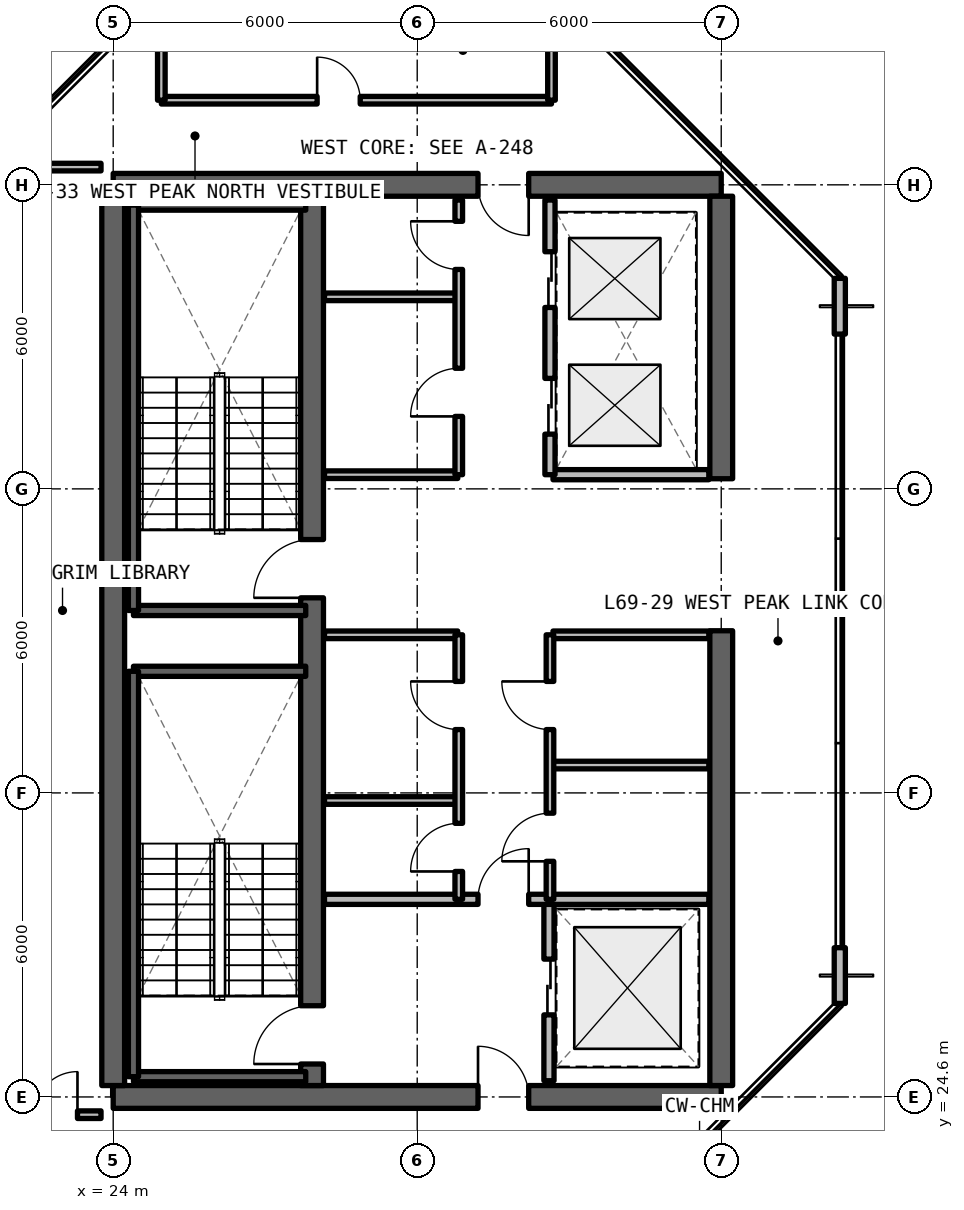
"""IFC4 building model, lengths in metres.
Left out: names, types, materials, properties, quantities, classifications, styles, units other than length and angle.
Written with IfcOpenShell. Run it as: python <this file> out.ifc"""

import sys

from ifc_helpers import new_model, si_unit, direction, frame, frame_2d, origin, place, context, subcontext, project, spatial, rectangle, extrude, element, fill, save


model = new_model("IFC4")
c1 = context("Model", 3, precision=1e-05, world=origin(), true_north=direction((0.0, 1.0)))
c2 = subcontext(c1, "Body", "Model", "MODEL_VIEW")
j1 = project(units=[si_unit("LENGTHUNIT", "METRE"), si_unit("PLANEANGLEUNIT", "RADIAN")], contexts=[c1])
p1 = place(None, origin())
s1 = spatial("IfcSite", under=j1, at=p1, CompositionType="ELEMENT")
p2 = place(p1, origin())
s2 = spatial("IfcBuilding", under=s1, at=p2, CompositionType="ELEMENT")
p3 = place(p2, frame((0.0, 0.0, 246.18)))
s3 = spatial("IfcBuildingStorey", under=s2, at=p3, CompositionType="ELEMENT", Elevation=246.18)
p4 = place(p3, frame((24.0, 24.6, 0.0), z_axis=(0.0, 0.0, 1.0), x_axis=(1.0, 0.0, 0.0)))
e1 = element("IfcWall", 1, at=p4, inside=s3, PredefinedType="SHEAR", context=c2, shape_type="SweptSolid", body=[
    extrude(rectangle(XDim=12.0, YDim=0.45, at=frame_2d((6.0, 0.0))), origin(), (0.0, 0.0, 1.0), 3.63),
])
p5 = place(p4, frame((7.2, 0.0, 0.0)))
e2 = element("IfcOpeningElement", 2, at=p5, cuts=e1, PredefinedType="OPENING", context=c2, shape_type="SweptSolid", body=[
    extrude(rectangle(XDim=1.0, YDim=2.15, at=frame_2d((0.5, 1.075))), frame((0.0, 0.235, 0.0), z_axis=(0.0, -1.0, 0.0), x_axis=(1.0, 0.0, 0.0)), (0.0, 0.0, 1.0), 0.47),
])
p6 = place(p3, frame((36.0, 42.6, 0.0), z_axis=(0.0, 0.0, 1.0), x_axis=(-1.0, 0.0, 0.0)))
e3 = element("IfcWall", 3, at=p6, inside=s3, PredefinedType="SHEAR", context=c2, shape_type="SweptSolid", body=[
    extrude(rectangle(XDim=12.0, YDim=0.45, at=frame_2d((6.0, 0.0))), origin(), (0.0, 0.0, 1.0), 3.63),
])
p7 = place(p6, frame((3.8, 0.0, 0.0)))
e4 = element("IfcOpeningElement", 4, at=p7, cuts=e3, PredefinedType="OPENING", context=c2, shape_type="SweptSolid", body=[
    extrude(rectangle(XDim=1.0, YDim=2.15, at=frame_2d((0.5, 1.075))), frame((0.0, 0.235, 0.0), z_axis=(0.0, -1.0, 0.0), x_axis=(1.0, 0.0, 0.0)), (0.0, 0.0, 1.0), 0.47),
])
p8 = place(p3, frame((24.0, 24.825, 0.0), z_axis=(0.0, 0.0, 1.0), x_axis=(0.0, 1.0, 0.0)))
e5 = element("IfcWall", 5, at=p8, inside=s3, PredefinedType="SHEAR", context=c2, shape_type="SweptSolid", body=[
    extrude(rectangle(XDim=17.55, YDim=0.45, at=frame_2d((8.775, 0.0))), origin(), (0.0, 0.0, 1.0), 3.63),
])
p9 = place(p3, frame((36.0, 24.825, 0.0), z_axis=(0.0, 0.0, 1.0), x_axis=(0.0, 1.0, 0.0)))
e6 = element("IfcWall", 6, at=p9, inside=s3, PredefinedType="SHEAR", context=c2, shape_type="SweptSolid", body=[
    extrude(rectangle(XDim=8.975, YDim=0.45, at=frame_2d((4.488, 0.0))), origin(), (0.0, 0.0, 1.0), 3.63),
])
p10 = place(p3, frame((36.0, 36.8, 0.0), z_axis=(0.0, 0.0, 1.0), x_axis=(0.0, 1.0, 0.0)))
e7 = element("IfcWall", 7, at=p10, inside=s3, PredefinedType="SHEAR", context=c2, shape_type="SweptSolid", body=[
    extrude(rectangle(XDim=5.575, YDim=0.45, at=frame_2d((2.788, 0.0))), origin(), (0.0, 0.0, 1.0), 3.63),
])
p11 = place(p3, frame((27.925, 24.825, 0.0), z_axis=(0.0, 0.0, 1.0), x_axis=(0.0, 1.0, 0.0)))
e8 = element("IfcWall", 8, at=p11, inside=s3, PredefinedType="SHEAR", context=c2, shape_type="SweptSolid", body=[
    extrude(rectangle(XDim=17.55, YDim=0.45, at=frame_2d((8.775, 0.0))), origin(), (0.0, 0.0, 1.0), 3.63),
])
p12 = place(p11, frame((0.425, 0.0, 0.0)))
e9 = element("IfcOpeningElement", 9, at=p12, cuts=e8, PredefinedType="OPENING", context=c2, shape_type="SweptSolid", body=[
    extrude(rectangle(XDim=1.15, YDim=2.15, at=frame_2d((0.575, 1.075))), frame((0.0, 0.235, 0.0), z_axis=(0.0, -1.0, 0.0), x_axis=(1.0, 0.0, 0.0)), (0.0, 0.0, 1.0), 0.47),
])
p13 = place(p11, frame((9.625, 0.0, 0.0)))
e10 = element("IfcOpeningElement", 10, at=p13, cuts=e8, PredefinedType="OPENING", context=c2, shape_type="SweptSolid", body=[
    extrude(rectangle(XDim=1.15, YDim=2.15, at=frame_2d((0.575, 1.075))), frame((0.0, 0.235, 0.0), z_axis=(0.0, -1.0, 0.0), x_axis=(1.0, 0.0, 0.0)), (0.0, 0.0, 1.0), 0.47),
])
for number, where, z_axis, x_axis in (
    (11, (38.34, 26.446, 0.0), (0.0, 0.0, 1.0), (0.0, 1.0, 0.0)),
    (12, (38.34, 39.654, 0.0), (0.0, 0.0, 1.0), (0.0, 1.0, 0.0)),
):
    element("IfcWall", number, at=place(p3, frame(where, z_axis=z_axis, x_axis=x_axis)), inside=s3, PredefinedType="SOLIDWALL", context=c2, shape_type="SweptSolid", body=[
        extrude(rectangle(XDim=1.1, YDim=0.22, at=frame_2d((0.55, 0.0))), origin(), (0.0, 0.0, 1.0), 3.41),
    ])
p14 = place(p3, frame((32.6, 24.92, 0.0), z_axis=(0.0, 0.0, 1.0), x_axis=(0.0, 1.0, 0.0)))
e13 = element("IfcWall", 13, at=p14, inside=s3, PredefinedType="SOLIDWALL", context=c2, shape_type="SweptSolid", body=[
    extrude(rectangle(XDim=3.58, YDim=0.2, at=frame_2d((1.79, 0.0))), origin(), (0.0, 0.0, 1.0), 2.63),
])
p15 = place(p14, frame((1.3, 0.0, 0.0)))
e14 = element("IfcOpeningElement", 14, at=p15, cuts=e13, PredefinedType="OPENING", context=c2, shape_type="SweptSolid", body=[
    extrude(rectangle(XDim=1.1, YDim=2.2, at=frame_2d((0.55, 1.1))), frame((0.0, 0.11, 0.0), z_axis=(0.0, -1.0, 0.0), x_axis=(1.0, 0.0, 0.0)), (0.0, 0.0, 1.0), 0.22),
])
p16 = place(p3, frame((28.17, 28.5, 0.0), z_axis=(0.0, 0.0, 1.0), x_axis=(1.0, 0.0, 0.0)))
e15 = element("IfcWall", 15, at=p16, inside=s3, PredefinedType="SOLIDWALL", context=c2, shape_type="SweptSolid", body=[
    extrude(rectangle(XDim=7.585, YDim=0.2, at=frame_2d((3.792, 0.0))), origin(), (0.0, 0.0, 1.0), 2.63),
])
p17 = place(p16, frame((3.03, 0.0, 0.0)))
e16 = element("IfcOpeningElement", 16, at=p17, cuts=e15, PredefinedType="OPENING", context=c2, shape_type="SweptSolid", body=[
    extrude(rectangle(XDim=1.0, YDim=2.15, at=frame_2d((0.5, 1.075))), frame((0.0, 0.11, 0.0), z_axis=(0.0, -1.0, 0.0), x_axis=(1.0, 0.0, 0.0)), (0.0, 0.0, 1.0), 0.22),
])
for number, where, z_axis, x_axis in (
    (17, (28.17, 30.45, 0.0), (0.0, 0.0, 1.0), (1.0, 0.0, 0.0)),
    (18, (28.17, 33.72, 0.0), (0.0, 0.0, 1.0), (1.0, 0.0, 0.0)),
):
    element("IfcWall", number, at=place(p3, frame(where, z_axis=z_axis, x_axis=x_axis)), inside=s3, PredefinedType="SOLIDWALL", context=c2, shape_type="SweptSolid", body=[
        extrude(rectangle(XDim=2.63, YDim=0.15, at=frame_2d((1.315, 0.0))), origin(), (0.0, 0.0, 1.0), 2.63),
    ])
p18 = place(p3, frame((30.82, 28.5, 0.0), z_axis=(0.0, 0.0, 1.0), x_axis=(0.0, 1.0, 0.0)))
e19 = element("IfcWall", 19, at=p18, inside=s3, PredefinedType="SOLIDWALL", context=c2, shape_type="SweptSolid", body=[
    extrude(rectangle(XDim=5.22, YDim=0.15, at=frame_2d((2.61, 0.0))), origin(), (0.0, 0.0, 1.0), 2.63),
])
p19 = place(p18, frame((0.55, 0.0, 0.0)))
e20 = element("IfcOpeningElement", 20, at=p19, cuts=e19, PredefinedType="OPENING", context=c2, shape_type="SweptSolid", body=[
    extrude(rectangle(XDim=0.95, YDim=2.15, at=frame_2d((0.475, 1.075))), frame((0.0, 0.085, 0.0), z_axis=(0.0, -1.0, 0.0), x_axis=(1.0, 0.0, 0.0)), (0.0, 0.0, 1.0), 0.17),
])
p20 = place(p18, frame((3.35, 0.0, 0.0)))
e21 = element("IfcOpeningElement", 21, at=p20, cuts=e19, PredefinedType="OPENING", context=c2, shape_type="SweptSolid", body=[
    extrude(rectangle(XDim=0.95, YDim=2.15, at=frame_2d((0.475, 1.075))), frame((0.0, 0.085, 0.0), z_axis=(0.0, -1.0, 0.0), x_axis=(1.0, 0.0, 0.0)), (0.0, 0.0, 1.0), 0.17),
])
for number, where, z_axis, x_axis in (
    (22, (32.68, 31.15, 0.0), (0.0, 0.0, 1.0), (1.0, 0.0, 0.0)),
    (23, (32.68, 33.72, 0.0), (0.0, 0.0, 1.0), (1.0, 0.0, 0.0)),
):
    element("IfcWall", number, at=place(p3, frame(where, z_axis=z_axis, x_axis=x_axis)), inside=s3, PredefinedType="SOLIDWALL", context=c2, shape_type="SweptSolid", body=[
        extrude(rectangle(XDim=3.075, YDim=0.15, at=frame_2d((1.538, 0.0))), origin(), (0.0, 0.0, 1.0), 2.63),
    ])
p21 = place(p3, frame((32.62, 28.5, 0.0), z_axis=(0.0, 0.0, 1.0), x_axis=(0.0, 1.0, 0.0)))
e24 = element("IfcWall", 24, at=p21, inside=s3, PredefinedType="SOLIDWALL", context=c2, shape_type="SweptSolid", body=[
    extrude(rectangle(XDim=5.22, YDim=0.15, at=frame_2d((2.61, 0.0))), origin(), (0.0, 0.0, 1.0), 2.63),
])
p22 = place(p21, frame((0.75, 0.0, 0.0)))
e25 = element("IfcOpeningElement", 25, at=p22, cuts=e24, PredefinedType="OPENING", context=c2, shape_type="SweptSolid", body=[
    extrude(rectangle(XDim=0.95, YDim=2.15, at=frame_2d((0.475, 1.075))), frame((0.0, 0.085, 0.0), z_axis=(0.0, -1.0, 0.0), x_axis=(1.0, 0.0, 0.0)), (0.0, 0.0, 1.0), 0.17),
])
p23 = place(p21, frame((3.35, 0.0, 0.0)))
e26 = element("IfcOpeningElement", 26, at=p23, cuts=e24, PredefinedType="OPENING", context=c2, shape_type="SweptSolid", body=[
    extrude(rectangle(XDim=0.95, YDim=2.15, at=frame_2d((0.475, 1.075))), frame((0.0, 0.085, 0.0), z_axis=(0.0, -1.0, 0.0), x_axis=(1.0, 0.0, 0.0)), (0.0, 0.0, 1.0), 0.17),
])
for number, where, z_axis, x_axis in (
    (27, (28.17, 36.88, 0.0), (0.0, 0.0, 1.0), (1.0, 0.0, 0.0)),
    (28, (28.17, 40.39, 0.0), (0.0, 0.0, 1.0), (1.0, 0.0, 0.0)),
):
    element("IfcWall", number, at=place(p3, frame(where, z_axis=z_axis, x_axis=x_axis)), inside=s3, PredefinedType="SOLIDWALL", context=c2, shape_type="SweptSolid", body=[
        extrude(rectangle(XDim=2.63, YDim=0.15, at=frame_2d((1.315, 0.0))), origin(), (0.0, 0.0, 1.0), 2.63),
    ])
p24 = place(p3, frame((30.82, 36.88, 0.0), z_axis=(0.0, 0.0, 1.0), x_axis=(0.0, 1.0, 0.0)))
e29 = element("IfcWall", 29, at=p24, inside=s3, PredefinedType="SOLIDWALL", context=c2, shape_type="SweptSolid", body=[
    extrude(rectangle(XDim=5.42, YDim=0.15, at=frame_2d((2.71, 0.0))), origin(), (0.0, 0.0, 1.0), 2.63),
])
p25 = place(p24, frame((1.15, 0.0, 0.0)))
e30 = element("IfcOpeningElement", 30, at=p25, cuts=e29, PredefinedType="OPENING", context=c2, shape_type="SweptSolid", body=[
    extrude(rectangle(XDim=0.95, YDim=2.15, at=frame_2d((0.475, 1.075))), frame((0.0, 0.085, 0.0), z_axis=(0.0, -1.0, 0.0), x_axis=(1.0, 0.0, 0.0)), (0.0, 0.0, 1.0), 0.17),
])
p26 = place(p24, frame((4.05, 0.0, 0.0)))
e31 = element("IfcOpeningElement", 31, at=p26, cuts=e29, PredefinedType="OPENING", context=c2, shape_type="SweptSolid", body=[
    extrude(rectangle(XDim=0.95, YDim=2.15, at=frame_2d((0.475, 1.075))), frame((0.0, 0.085, 0.0), z_axis=(0.0, -1.0, 0.0), x_axis=(1.0, 0.0, 0.0)), (0.0, 0.0, 1.0), 0.17),
])
p27 = place(p3, frame((32.68, 36.88, 0.0), z_axis=(0.0, 0.0, 1.0), x_axis=(1.0, 0.0, 0.0)))
e32 = element("IfcWall", 32, at=p27, inside=s3, PredefinedType="SOLIDWALL", context=c2, shape_type="SweptSolid", body=[
    extrude(rectangle(XDim=3.075, YDim=0.2, at=frame_2d((1.538, 0.0))), origin(), (0.0, 0.0, 1.0), 2.63),
])
p28 = place(p3, frame((32.62, 36.88, 0.0), z_axis=(0.0, 0.0, 1.0), x_axis=(0.0, 1.0, 0.0)))
e33 = element("IfcWall", 33, at=p28, inside=s3, PredefinedType="SOLIDWALL", context=c2, shape_type="SweptSolid", body=[
    extrude(rectangle(XDim=5.42, YDim=0.2, at=frame_2d((2.71, 0.0))), origin(), (0.0, 0.0, 1.0), 2.63),
])
p29 = place(p28, frame((0.8, 0.0, 0.0)))
e34 = element("IfcOpeningElement", 34, at=p29, cuts=e33, PredefinedType="OPENING", context=c2, shape_type="SweptSolid", body=[
    extrude(rectangle(XDim=1.1, YDim=2.2, at=frame_2d((0.55, 1.1))), frame((0.0, 0.11, 0.0), z_axis=(0.0, -1.0, 0.0), x_axis=(1.0, 0.0, 0.0)), (0.0, 0.0, 1.0), 0.22),
])
p30 = place(p28, frame((3.3, 0.0, 0.0)))
e35 = element("IfcOpeningElement", 35, at=p30, cuts=e33, PredefinedType="OPENING", context=c2, shape_type="SweptSolid", body=[
    extrude(rectangle(XDim=1.1, YDim=2.2, at=frame_2d((0.55, 1.1))), frame((0.0, 0.11, 0.0), z_axis=(0.0, -1.0, 0.0), x_axis=(1.0, 0.0, 0.0)), (0.0, 0.0, 1.0), 0.22),
])
p31 = place(p3, frame((22.12, 24.25, 0.0), z_axis=(0.0, 0.0, 1.0), x_axis=(1.0, 0.0, 0.0)))
e36 = element("IfcWall", 36, at=p31, inside=s3, PredefinedType="SOLIDWALL", context=c2, shape_type="SweptSolid", body=[
    extrude(rectangle(XDim=1.64, YDim=0.15, at=frame_2d((0.82, 0.0))), origin(), (0.0, 0.0, 1.0), 2.63),
])
p32 = place(p31, frame((0.325, 0.0, 0.0)))
e37 = element("IfcOpeningElement", 37, at=p32, cuts=e36, PredefinedType="OPENING", context=c2, shape_type="SweptSolid", body=[
    extrude(rectangle(XDim=0.85, YDim=2.1, at=frame_2d((0.425, 1.05))), frame((0.0, 0.085, 0.0), z_axis=(0.0, -1.0, 0.0), x_axis=(1.0, 0.0, 0.0)), (0.0, 0.0, 1.0), 0.17),
])
p33 = place(p3, frame((22.12, 42.95, 0.0), z_axis=(0.0, 0.0, 1.0), x_axis=(1.0, 0.0, 0.0)))
e38 = element("IfcWall", 38, at=p33, inside=s3, PredefinedType="SOLIDWALL", context=c2, shape_type="SweptSolid", body=[
    extrude(rectangle(XDim=1.64, YDim=0.15, at=frame_2d((0.82, 0.0))), origin(), (0.0, 0.0, 1.0), 2.63),
])
p34 = place(p3, frame((24.95, 44.27, 0.0), z_axis=(0.0, 0.0, 1.0), x_axis=(1.0, 0.0, 0.0)))
e39 = element("IfcWall", 39, at=p34, inside=s3, PredefinedType="SOLIDWALL", context=c2, shape_type="SweptSolid", body=[
    extrude(rectangle(XDim=7.7, YDim=0.15, at=frame_2d((3.85, 0.0))), origin(), (0.0, 0.0, 1.0), 2.63),
])
p35 = place(p34, frame((3.075, 0.0, 0.0)))
e40 = element("IfcOpeningElement", 40, at=p35, cuts=e39, PredefinedType="OPENING", context=c2, shape_type="SweptSolid", body=[
    extrude(rectangle(XDim=0.85, YDim=2.1, at=frame_2d((0.425, 1.05))), frame((0.0, 0.085, 0.0), z_axis=(0.0, -1.0, 0.0), x_axis=(1.0, 0.0, 0.0)), (0.0, 0.0, 1.0), 0.17),
])
for number, where, z_axis, x_axis in (
    (41, (24.95, 44.27, 0.0), (0.0, 0.0, 1.0), (0.0, 1.0, 0.0)),
    (42, (32.65, 44.27, 0.0), (0.0, 0.0, 1.0), (0.0, 1.0, 0.0)),
):
    element("IfcWall", number, at=place(p3, frame(where, z_axis=z_axis, x_axis=x_axis)), inside=s3, PredefinedType="SOLIDWALL", context=c2, shape_type="SweptSolid", body=[
        extrude(rectangle(XDim=2.01, YDim=0.15, at=frame_2d((1.005, 0.0))), origin(), (0.0, 0.0, 1.0), 2.63),
    ])
for number, where, z_axis, x_axis in (
    (43, (24.4, 25.0, 0.0), (0.0, 0.0, 1.0), (1.0, 0.0, 0.0)),
    (44, (27.8, 33.0, 0.0), (0.0, 0.0, 1.0), (-1.0, 0.0, 0.0)),
):
    element("IfcWall", number, at=place(p3, frame(where, z_axis=z_axis, x_axis=x_axis)), inside=s3, PredefinedType="SOLIDWALL", context=c2, shape_type="SweptSolid", body=[
        extrude(rectangle(XDim=3.4, YDim=0.2, at=frame_2d((1.7, 0.0))), origin(), (0.0, 0.0, 1.0), 3.63),
    ])
p36 = place(p3, frame((24.4, 33.0, 0.0), z_axis=(0.0, 0.0, 1.0), x_axis=(0.0, -1.0, 0.0)))
e45 = element("IfcWall", 45, at=p36, inside=s3, PredefinedType="SOLIDWALL", context=c2, shape_type="SweptSolid", body=[
    extrude(rectangle(XDim=8.0, YDim=0.2, at=frame_2d((4.0, 0.0))), origin(), (0.0, 0.0, 1.0), 3.63),
])
for number, where, z_axis, x_axis in (
    (46, (24.4, 34.2, 0.0), (0.0, 0.0, 1.0), (1.0, 0.0, 0.0)),
    (47, (27.8, 42.2, 0.0), (0.0, 0.0, 1.0), (-1.0, 0.0, 0.0)),
):
    element("IfcWall", number, at=place(p3, frame(where, z_axis=z_axis, x_axis=x_axis)), inside=s3, PredefinedType="SOLIDWALL", context=c2, shape_type="SweptSolid", body=[
        extrude(rectangle(XDim=3.4, YDim=0.2, at=frame_2d((1.7, 0.0))), origin(), (0.0, 0.0, 1.0), 3.63),
    ])
p37 = place(p3, frame((24.4, 42.2, 0.0), z_axis=(0.0, 0.0, 1.0), x_axis=(0.0, -1.0, 0.0)))
e48 = element("IfcWall", 48, at=p37, inside=s3, PredefinedType="SOLIDWALL", context=c2, shape_type="SweptSolid", body=[
    extrude(rectangle(XDim=8.0, YDim=0.2, at=frame_2d((4.0, 0.0))), origin(), (0.0, 0.0, 1.0), 3.63),
])
p38 = place(p15, origin())
e49 = element("IfcDoor", 49, at=p38, inside=s3, OperationType="SLIDING_TO_LEFT", PredefinedType="DOOR", context=c2, shape_type="SweptSolid", body=[
    extrude(rectangle(XDim=1.1, YDim=2.2, at=frame_2d((0.55, 1.1))), frame((0.0, 0.025, 0.0), z_axis=(0.0, -1.0, 0.0), x_axis=(1.0, 0.0, 0.0)), (0.0, 0.0, 1.0), 0.05),
])
fill(e14, e49)
p39 = place(p17, origin())
e50 = element("IfcDoor", 50, at=p39, inside=s3, OperationType="SINGLE_SWING_RIGHT", PredefinedType="DOOR", context=c2, shape_type="SweptSolid", body=[
    extrude(rectangle(XDim=1.0, YDim=2.15, at=frame_2d((0.5, 1.075))), frame((0.0, 0.025, 0.0), z_axis=(0.0, -1.0, 0.0), x_axis=(1.0, 0.0, 0.0)), (0.0, 0.0, 1.0), 0.05),
])
fill(e16, e50)
p40 = place(p19, origin())
e51 = element("IfcDoor", 51, at=p40, inside=s3, OperationType="SINGLE_SWING_LEFT", PredefinedType="DOOR", context=c2, shape_type="SweptSolid", body=[
    extrude(rectangle(XDim=0.95, YDim=2.15, at=frame_2d((0.475, 1.075))), frame((0.0, 0.025, 0.0), z_axis=(0.0, -1.0, 0.0), x_axis=(1.0, 0.0, 0.0)), (0.0, 0.0, 1.0), 0.05),
])
fill(e20, e51)
p41 = place(p20, origin())
e52 = element("IfcDoor", 52, at=p41, inside=s3, OperationType="SINGLE_SWING_RIGHT", PredefinedType="DOOR", context=c2, shape_type="SweptSolid", body=[
    extrude(rectangle(XDim=0.95, YDim=2.15, at=frame_2d((0.475, 1.075))), frame((0.0, 0.025, 0.0), z_axis=(0.0, -1.0, 0.0), x_axis=(1.0, 0.0, 0.0)), (0.0, 0.0, 1.0), 0.05),
])
fill(e21, e52)
p42 = place(p22, origin())
e53 = element("IfcDoor", 53, at=p42, inside=s3, OperationType="SINGLE_SWING_LEFT", PredefinedType="DOOR", context=c2, shape_type="SweptSolid", body=[
    extrude(rectangle(XDim=0.95, YDim=2.15, at=frame_2d((0.475, 1.075))), frame((0.0, 0.025, 0.0), z_axis=(0.0, -1.0, 0.0), x_axis=(1.0, 0.0, 0.0)), (0.0, 0.0, 1.0), 0.05),
])
fill(e25, e53)
p43 = place(p23, origin())
e54 = element("IfcDoor", 54, at=p43, inside=s3, OperationType="SINGLE_SWING_RIGHT", PredefinedType="DOOR", context=c2, shape_type="SweptSolid", body=[
    extrude(rectangle(XDim=0.95, YDim=2.15, at=frame_2d((0.475, 1.075))), frame((0.0, 0.025, 0.0), z_axis=(0.0, -1.0, 0.0), x_axis=(1.0, 0.0, 0.0)), (0.0, 0.0, 1.0), 0.05),
])
fill(e26, e54)
p44 = place(p25, origin())
e55 = element("IfcDoor", 55, at=p44, inside=s3, OperationType="SINGLE_SWING_LEFT", PredefinedType="DOOR", context=c2, shape_type="SweptSolid", body=[
    extrude(rectangle(XDim=0.95, YDim=2.15, at=frame_2d((0.475, 1.075))), frame((0.0, 0.025, 0.0), z_axis=(0.0, -1.0, 0.0), x_axis=(1.0, 0.0, 0.0)), (0.0, 0.0, 1.0), 0.05),
])
fill(e30, e55)
p45 = place(p26, origin())
e56 = element("IfcDoor", 56, at=p45, inside=s3, OperationType="SINGLE_SWING_RIGHT", PredefinedType="DOOR", context=c2, shape_type="SweptSolid", body=[
    extrude(rectangle(XDim=0.95, YDim=2.15, at=frame_2d((0.475, 1.075))), frame((0.0, 0.025, 0.0), z_axis=(0.0, -1.0, 0.0), x_axis=(1.0, 0.0, 0.0)), (0.0, 0.0, 1.0), 0.05),
])
fill(e31, e56)
p46 = place(p29, origin())
e57 = element("IfcDoor", 57, at=p46, inside=s3, OperationType="SLIDING_TO_LEFT", PredefinedType="DOOR", context=c2, shape_type="SweptSolid", body=[
    extrude(rectangle(XDim=1.1, YDim=2.2, at=frame_2d((0.55, 1.1))), frame((0.0, 0.025, 0.0), z_axis=(0.0, -1.0, 0.0), x_axis=(1.0, 0.0, 0.0)), (0.0, 0.0, 1.0), 0.05),
])
fill(e34, e57)
p47 = place(p30, origin())
e58 = element("IfcDoor", 58, at=p47, inside=s3, OperationType="SLIDING_TO_RIGHT", PredefinedType="DOOR", context=c2, shape_type="SweptSolid", body=[
    extrude(rectangle(XDim=1.1, YDim=2.2, at=frame_2d((0.55, 1.1))), frame((0.0, 0.025, 0.0), z_axis=(0.0, -1.0, 0.0), x_axis=(1.0, 0.0, 0.0)), (0.0, 0.0, 1.0), 0.05),
])
fill(e35, e58)
p48 = place(p32, origin())
e59 = element("IfcDoor", 59, at=p48, inside=s3, OperationType="SINGLE_SWING_RIGHT", PredefinedType="DOOR", context=c2, shape_type="SweptSolid", body=[
    extrude(rectangle(XDim=0.85, YDim=2.1, at=frame_2d((0.425, 1.05))), frame((0.0, 0.025, 0.0), z_axis=(0.0, -1.0, 0.0), x_axis=(1.0, 0.0, 0.0)), (0.0, 0.0, 1.0), 0.05),
])
fill(e37, e59)
p49 = place(p35, origin())
e60 = element("IfcDoor", 60, at=p49, inside=s3, OperationType="SINGLE_SWING_LEFT", PredefinedType="DOOR", context=c2, shape_type="SweptSolid", body=[
    extrude(rectangle(XDim=0.85, YDim=2.1, at=frame_2d((0.425, 1.05))), frame((0.0, 0.025, 0.0), z_axis=(0.0, -1.0, 0.0), x_axis=(1.0, 0.0, 0.0)), (0.0, 0.0, 1.0), 0.05),
])
fill(e40, e60)
p50 = place(p12, origin())
e61 = element("IfcDoor", 61, at=p50, inside=s3, OperationType="SINGLE_SWING_LEFT", PredefinedType="DOOR", context=c2, shape_type="SweptSolid", body=[
    extrude(rectangle(XDim=1.15, YDim=2.15, at=frame_2d((0.575, 1.075))), frame((0.0, 0.025, 0.0), z_axis=(0.0, -1.0, 0.0), x_axis=(1.0, 0.0, 0.0)), (0.0, 0.0, 1.0), 0.05),
])
fill(e9, e61)
p51 = place(p13, origin())
e62 = element("IfcDoor", 62, at=p51, inside=s3, OperationType="SINGLE_SWING_RIGHT", PredefinedType="DOOR", context=c2, shape_type="SweptSolid", body=[
    extrude(rectangle(XDim=1.15, YDim=2.15, at=frame_2d((0.575, 1.075))), frame((0.0, 0.025, 0.0), z_axis=(0.0, -1.0, 0.0), x_axis=(1.0, 0.0, 0.0)), (0.0, 0.0, 1.0), 0.05),
])
fill(e10, e62)
p52 = place(p5, origin())
e63 = element("IfcDoor", 63, at=p52, inside=s3, OperationType="SINGLE_SWING_LEFT", PredefinedType="DOOR", context=c2, shape_type="SweptSolid", body=[
    extrude(rectangle(XDim=1.0, YDim=2.15, at=frame_2d((0.5, 1.075))), frame((0.0, 0.025, 0.0), z_axis=(0.0, -1.0, 0.0), x_axis=(1.0, 0.0, 0.0)), (0.0, 0.0, 1.0), 0.05),
])
fill(e2, e63)
p53 = place(p7, origin())
e64 = element("IfcDoor", 64, at=p53, inside=s3, OperationType="SINGLE_SWING_RIGHT", PredefinedType="DOOR", context=c2, shape_type="SweptSolid", body=[
    extrude(rectangle(XDim=1.0, YDim=2.15, at=frame_2d((0.5, 1.075))), frame((0.0, 0.025, 0.0), z_axis=(0.0, -1.0, 0.0), x_axis=(1.0, 0.0, 0.0)), (0.0, 0.0, 1.0), 0.05),
])
fill(e4, e64)
save(model, sys.argv[1])
